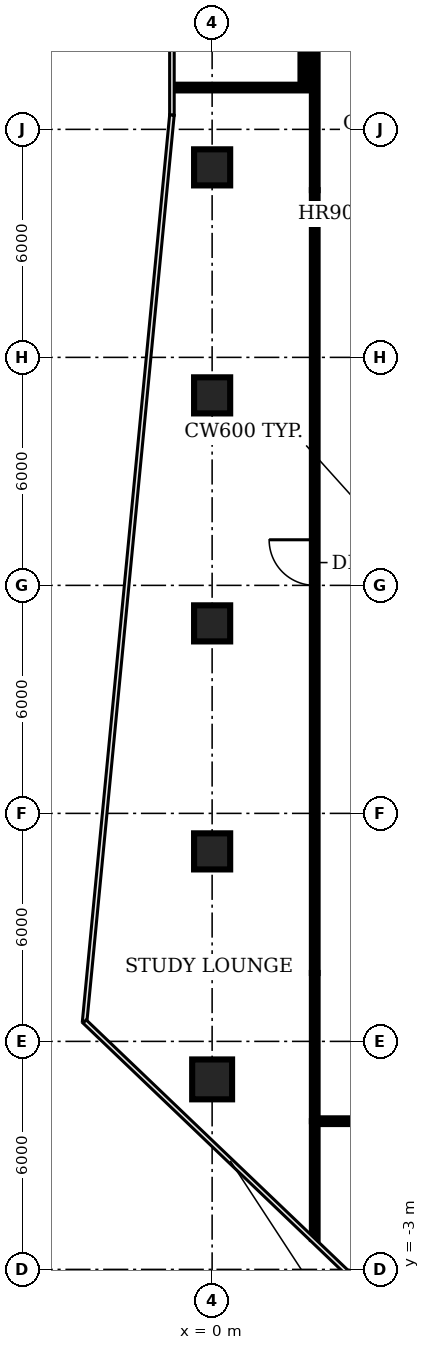
"""IFC4 building model, lengths in metres.
Left out: names, types, materials, properties, quantities, classifications, styles, units other than length and angle.
Written with IfcOpenShell. Run it as: python <this file> out.ifc"""

import sys

from ifc_helpers import new_model, si_unit, direction, frame, frame_2d, origin, origin_2d, place, context, subcontext, project, spatial, rectangle, circle, extrude, element, fill, save


model = new_model("IFC4")
c1 = context("Model", 3, precision=1e-05, world=origin(), true_north=direction((0.0, 1.0)))
c2 = subcontext(c1, "Body", "Model", "MODEL_VIEW")
j1 = project(units=[si_unit("LENGTHUNIT", "METRE"), si_unit("PLANEANGLEUNIT", "RADIAN")], contexts=[c1])
p1 = place(None, origin())
s1 = spatial("IfcSite", under=j1, at=p1, CompositionType="ELEMENT")
p2 = place(p1, origin())
s2 = spatial("IfcBuilding", under=s1, at=p2, CompositionType="ELEMENT")
p3 = place(p2, frame((0.0, 0.0, 146.6)))
s3 = spatial("IfcBuildingStorey", under=s2, at=p3, CompositionType="ELEMENT", Elevation=146.6)
p4 = place(p3, frame((0.0, 2.0, -0.35), z_axis=(0.0, 0.0, 1.0), x_axis=(1.0, 0.0, 0.0)))
e1 = element("IfcColumn", 1, at=p4, inside=s3, PredefinedType="COLUMN", context=c2, shape_type="SweptSolid", body=[
    extrude(circle(Radius=0.525, at=origin_2d()), origin(), (0.0, 0.0, 1.0), 4.2),
])
for number, where, z_axis, x_axis in (
    (2, (0.0, 8.0, -0.35), (0.0, 0.0, 1.0), (1.0, 0.0, 0.0)),
    (3, (0.0, 14.0, -0.35), (0.0, 0.0, 1.0), (1.0, 0.0, 0.0)),
    (4, (0.0, 20.0, -0.35), (0.0, 0.0, 1.0), (1.0, 0.0, 0.0)),
    (5, (0.0, 26.0, -0.35), (0.0, 0.0, 1.0), (1.0, 0.0, 0.0)),
):
    element("IfcColumn", number, at=place(p3, frame(where, z_axis=z_axis, x_axis=x_axis)), inside=s3, PredefinedType="COLUMN", context=c2, shape_type="SweptSolid", body=[
        extrude(rectangle(XDim=0.95, YDim=0.95, at=origin_2d()), origin(), (0.0, 0.0, 1.0), 4.2),
    ])
p5 = place(p3, frame((-0.998, 28.1, 0.0), z_axis=(0.0, 0.0, 1.0), x_axis=(1.0, 0.0, 0.0)))
e6 = element("IfcWall", 6, at=p5, inside=s3, PredefinedType="PARTITIONING", context=c2, shape_type="SweptSolid", body=[
    extrude(rectangle(XDim=3.698, YDim=0.15, at=frame_2d((1.849, 0.0))), origin(), (0.0, 0.0, 1.0), 2.88),
])
p6 = place(p3, frame((2.4, 28.1, 0.0), z_axis=(0.0, 0.0, 1.0), x_axis=(0.0, 1.0, 0.0)))
e7 = element("IfcWall", 7, at=p6, inside=s3, PredefinedType="PARTITIONING", context=c2, shape_type="SweptSolid", body=[
    extrude(rectangle(XDim=6.0, YDim=0.15, at=frame_2d((3.0, 0.0))), origin(), (0.0, 0.0, 1.0), 2.88),
])
p7 = place(p3, frame((2.7, -2.2, 0.0), z_axis=(0.0, 0.0, 1.0), x_axis=(0.0, 1.0, 0.0)))
e8 = element("IfcWall", 8, at=p7, inside=s3, PredefinedType="PARTITIONING", context=c2, shape_type="SweptSolid", body=[
    extrude(rectangle(XDim=3.1, YDim=0.15, at=frame_2d((1.55, 0.0))), origin(), (0.0, 0.0, 1.0), 2.88),
])
p8 = place(p3, frame((2.7, 0.9, 0.0), z_axis=(0.0, 0.0, 1.0), x_axis=(0.0, 1.0, 0.0)))
e9 = element("IfcWall", 9, at=p8, inside=s3, PredefinedType="PARTITIONING", context=c2, shape_type="SweptSolid", body=[
    extrude(rectangle(XDim=3.9, YDim=0.15, at=frame_2d((1.95, 0.0))), origin(), (0.0, 0.0, 1.0), 2.88),
])
p9 = place(p3, frame((2.7, 4.8, 0.0), z_axis=(0.0, 0.0, 1.0), x_axis=(0.0, 1.0, 0.0)))
e10 = element("IfcWall", 10, at=p9, inside=s3, PredefinedType="PARTITIONING", context=c2, shape_type="SweptSolid", body=[
    extrude(rectangle(XDim=20.6, YDim=0.15, at=frame_2d((10.3, 0.0))), origin(), (0.0, 0.0, 1.0), 2.88),
])
p10 = place(p9, frame((10.2, 0.0, 0.0)))
e11 = element("IfcOpeningElement", 11, at=p10, cuts=e10, PredefinedType="OPENING", context=c2, shape_type="SweptSolid", body=[
    extrude(rectangle(XDim=1.2, YDim=2.1, at=frame_2d((0.6, 1.05))), frame((0.0, 0.085, 0.0), z_axis=(0.0, -1.0, 0.0), x_axis=(1.0, 0.0, 0.0)), (0.0, 0.0, 1.0), 0.17),
])
p11 = place(p3, frame((2.7, 25.4, 0.0), z_axis=(0.0, 0.0, 1.0), x_axis=(0.0, 1.0, 0.0)))
e12 = element("IfcWall", 12, at=p11, inside=s3, PredefinedType="PARTITIONING", context=c2, shape_type="SweptSolid", body=[
    extrude(rectangle(XDim=3.9, YDim=0.15, at=frame_2d((1.95, 0.0))), origin(), (0.0, 0.0, 1.0), 2.88),
])
p12 = place(p3, frame((27.3, 0.9, 0.0), z_axis=(0.0, 0.0, 1.0), x_axis=(-1.0, 0.0, 0.0)))
e13 = element("IfcWall", 13, at=p12, inside=s3, PredefinedType="PARTITIONING", context=c2, shape_type="SweptSolid", body=[
    extrude(rectangle(XDim=24.6, YDim=0.15, at=frame_2d((12.3, 0.0))), origin(), (0.0, 0.0, 1.0), 2.88),
])
p13 = place(p12, frame((11.8, 0.0, 0.0)))
e14 = element("IfcOpeningElement", 14, at=p13, cuts=e13, PredefinedType="OPENING", context=c2, shape_type="SweptSolid", body=[
    extrude(rectangle(XDim=1.2, YDim=2.1, at=frame_2d((0.6, 1.05))), frame((0.0, 0.085, 0.0), z_axis=(0.0, -1.0, 0.0), x_axis=(1.0, 0.0, 0.0)), (0.0, 0.0, 1.0), 0.17),
])
p14 = place(p10, origin())
e15 = element("IfcDoor", 15, at=p14, inside=s3, OperationType="SINGLE_SWING_RIGHT", PredefinedType="DOOR", context=c2, shape_type="SweptSolid", body=[
    extrude(rectangle(XDim=1.2, YDim=2.1, at=frame_2d((0.6, 1.05))), frame((0.0, 0.025, 0.0), z_axis=(0.0, -1.0, 0.0), x_axis=(1.0, 0.0, 0.0)), (0.0, 0.0, 1.0), 0.05),
])
fill(e11, e15)
save(model, sys.argv[1])
